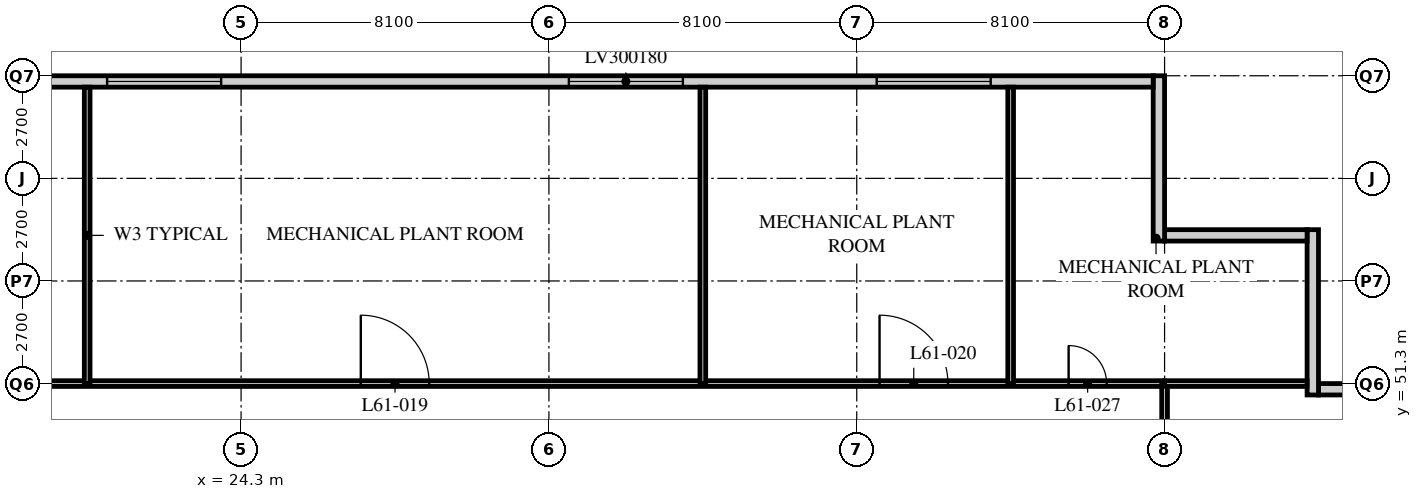
"""IFC4 building model, lengths in metres.
Left out: names, types, materials, properties, quantities, classifications, styles, units other than length and angle.
Written with IfcOpenShell. Run it as: python <this file> out.ifc"""

import sys

from ifc_helpers import new_model, si_unit, direction, frame, frame_2d, origin, place, context, subcontext, project, spatial, rectangle, extrude, element, fill, save


model = new_model("IFC4")
c1 = context("Model", 3, precision=1e-05, world=origin(), true_north=direction((0.0, 1.0)))
c2 = subcontext(c1, "Body", "Model", "MODEL_VIEW")
j1 = project(units=[si_unit("LENGTHUNIT", "METRE"), si_unit("PLANEANGLEUNIT", "RADIAN")], contexts=[c1])
p1 = place(None, origin())
s1 = spatial("IfcSite", under=j1, at=p1, CompositionType="ELEMENT")
p2 = place(p1, origin())
s2 = spatial("IfcBuilding", under=s1, at=p2, CompositionType="ELEMENT")
p3 = place(p2, frame((0.0, 0.0, 235.2)))
s3 = spatial("IfcBuildingStorey", under=s2, at=p3, CompositionType="ELEMENT", Elevation=235.2)
p4 = place(p3, frame((56.4, 51.15, 0.0), z_axis=(0.0, 0.0, 1.0), x_axis=(-1.0, 0.0, 0.0)))
e1 = element("IfcWall", 1, at=p4, inside=s3, PredefinedType="SOLIDWALL", context=c2, shape_type="SweptSolid", body=[
    extrude(rectangle(XDim=3.75, YDim=0.3, at=frame_2d((1.875, 0.0))), origin(), (0.0, 0.0, 1.0), 6.95),
])
p5 = place(p3, frame((52.5, 51.0, 0.0), z_axis=(0.0, 0.0, 1.0), x_axis=(0.0, 1.0, 0.0)))
e2 = element("IfcWall", 2, at=p5, inside=s3, PredefinedType="SOLIDWALL", context=c2, shape_type="SweptSolid", body=[
    extrude(rectangle(XDim=4.35, YDim=0.3, at=frame_2d((2.175, 0.0))), origin(), (0.0, 0.0, 1.0), 6.95),
])
p6 = place(p3, frame((52.35, 55.2, 0.0), z_axis=(0.0, 0.0, 1.0), x_axis=(-1.0, 0.0, 0.0)))
e3 = element("IfcWall", 3, at=p6, inside=s3, PredefinedType="SOLIDWALL", context=c2, shape_type="SweptSolid", body=[
    extrude(rectangle(XDim=3.75, YDim=0.3, at=frame_2d((1.875, 0.0))), origin(), (0.0, 0.0, 1.0), 6.95),
])
p7 = place(p3, frame((48.45, 55.05, 0.0), z_axis=(0.0, 0.0, 1.0), x_axis=(0.0, 1.0, 0.0)))
e4 = element("IfcWall", 4, at=p7, inside=s3, PredefinedType="SOLIDWALL", context=c2, shape_type="SweptSolid", body=[
    extrude(rectangle(XDim=4.35, YDim=0.3, at=frame_2d((2.175, 0.0))), origin(), (0.0, 0.0, 1.0), 5.95),
])
p8 = place(p3, frame((48.3, 59.25, 0.0), z_axis=(0.0, 0.0, 1.0), x_axis=(-1.0, 0.0, 0.0)))
e5 = element("IfcWall", 5, at=p8, inside=s3, PredefinedType="SOLIDWALL", context=c2, shape_type="SweptSolid", body=[
    extrude(rectangle(XDim=40.2, YDim=0.3, at=frame_2d((20.1, 0.0))), origin(), (0.0, 0.0, 1.0), 5.95),
])
p9 = place(p8, frame((4.275, 0.0, 1.0)))
e6 = element("IfcOpeningElement", 6, at=p9, cuts=e5, PredefinedType="OPENING", context=c2, shape_type="SweptSolid", body=[
    extrude(rectangle(XDim=3.0, YDim=1.8, at=frame_2d((1.5, 0.9))), frame((0.0, 0.16, 0.0), z_axis=(0.0, -1.0, 0.0), x_axis=(1.0, 0.0, 0.0)), (0.0, 0.0, 1.0), 0.32),
])
p10 = place(p8, frame((12.375, 0.0, 1.0)))
e7 = element("IfcOpeningElement", 7, at=p10, cuts=e5, PredefinedType="OPENING", context=c2, shape_type="SweptSolid", body=[
    extrude(rectangle(XDim=3.0, YDim=1.8, at=frame_2d((1.5, 0.9))), frame((0.0, 0.16, 0.0), z_axis=(0.0, -1.0, 0.0), x_axis=(1.0, 0.0, 0.0)), (0.0, 0.0, 1.0), 0.32),
])
p11 = place(p8, frame((24.525, 0.0, 1.0)))
e8 = element("IfcOpeningElement", 8, at=p11, cuts=e5, PredefinedType="OPENING", context=c2, shape_type="SweptSolid", body=[
    extrude(rectangle(XDim=3.0, YDim=1.8, at=frame_2d((1.5, 0.9))), frame((0.0, 0.16, 0.0), z_axis=(0.0, -1.0, 0.0), x_axis=(1.0, 0.0, 0.0)), (0.0, 0.0, 1.0), 0.32),
])
p12 = place(p8, frame((32.625, 0.0, 1.0)))
e9 = element("IfcOpeningElement", 9, at=p12, cuts=e5, PredefinedType="OPENING", context=c2, shape_type="SweptSolid", body=[
    extrude(rectangle(XDim=3.0, YDim=1.8, at=frame_2d((1.5, 0.9))), frame((0.0, 0.16, 0.0), z_axis=(0.0, -1.0, 0.0), x_axis=(1.0, 0.0, 0.0)), (0.0, 0.0, 1.0), 0.32),
])
p13 = place(p3, frame((8.1, 51.3, 0.0), z_axis=(0.0, 0.0, 1.0), x_axis=(1.0, 0.0, 0.0)))
e10 = element("IfcWall", 10, at=p13, inside=s3, PredefinedType="PARTITIONING", context=c2, shape_type="SweptSolid", body=[
    extrude(rectangle(XDim=40.5, YDim=0.15, at=frame_2d((20.25, 0.0))), origin(), (0.0, 0.0, 1.0), 6.95),
])
p14 = place(p13, frame((8.45, 0.0, 0.0)))
e11 = element("IfcOpeningElement", 11, at=p14, cuts=e10, PredefinedType="OPENING", context=c2, shape_type="SweptSolid", body=[
    extrude(rectangle(XDim=1.8, YDim=2.4, at=frame_2d((0.9, 1.2))), frame((0.0, 0.085, 0.0), z_axis=(0.0, -1.0, 0.0), x_axis=(1.0, 0.0, 0.0)), (0.0, 0.0, 1.0), 0.17),
])
p15 = place(p13, frame((19.35, 0.0, 0.0)))
e12 = element("IfcOpeningElement", 12, at=p15, cuts=e10, PredefinedType="OPENING", context=c2, shape_type="SweptSolid", body=[
    extrude(rectangle(XDim=1.8, YDim=2.4, at=frame_2d((0.9, 1.2))), frame((0.0, 0.085, 0.0), z_axis=(0.0, -1.0, 0.0), x_axis=(1.0, 0.0, 0.0)), (0.0, 0.0, 1.0), 0.17),
])
p16 = place(p13, frame((33.0, 0.0, 0.0)))
e13 = element("IfcOpeningElement", 13, at=p16, cuts=e10, PredefinedType="OPENING", context=c2, shape_type="SweptSolid", body=[
    extrude(rectangle(XDim=1.8, YDim=2.4, at=frame_2d((0.9, 1.2))), frame((0.0, 0.085, 0.0), z_axis=(0.0, -1.0, 0.0), x_axis=(1.0, 0.0, 0.0)), (0.0, 0.0, 1.0), 0.17),
])
p17 = place(p13, frame((37.975, 0.0, 0.0)))
e14 = element("IfcOpeningElement", 14, at=p17, cuts=e10, PredefinedType="OPENING", context=c2, shape_type="SweptSolid", body=[
    extrude(rectangle(XDim=1.0, YDim=2.1, at=frame_2d((0.5, 1.05))), frame((0.0, 0.085, 0.0), z_axis=(0.0, -1.0, 0.0), x_axis=(1.0, 0.0, 0.0)), (0.0, 0.0, 1.0), 0.17),
])
p18 = place(p13, frame((1.525, 0.0, 0.0)))
e15 = element("IfcOpeningElement", 15, at=p18, cuts=e10, PredefinedType="OPENING", context=c2, shape_type="SweptSolid", body=[
    extrude(rectangle(XDim=1.0, YDim=2.1, at=frame_2d((0.5, 1.05))), frame((0.0, 0.085, 0.0), z_axis=(0.0, -1.0, 0.0), x_axis=(1.0, 0.0, 0.0)), (0.0, 0.0, 1.0), 0.17),
])
p19 = place(p3, frame((48.6, 18.9, 0.0), z_axis=(0.0, 0.0, 1.0), x_axis=(0.0, 1.0, 0.0)))
e16 = element("IfcWall", 16, at=p19, inside=s3, PredefinedType="PARTITIONING", context=c2, shape_type="SweptSolid", body=[
    extrude(rectangle(XDim=32.4, YDim=0.15, at=frame_2d((16.2, 0.0))), origin(), (0.0, 0.0, 1.0), 5.95),
])
p20 = place(p19, frame((10.95, 0.0, 0.0)))
e17 = element("IfcOpeningElement", 17, at=p20, cuts=e16, PredefinedType="OPENING", context=c2, shape_type="SweptSolid", body=[
    extrude(rectangle(XDim=1.8, YDim=2.4, at=frame_2d((0.9, 1.2))), frame((0.0, 0.085, 0.0), z_axis=(0.0, -1.0, 0.0), x_axis=(1.0, 0.0, 0.0)), (0.0, 0.0, 1.0), 0.17),
])
p21 = place(p19, frame((27.15, 0.0, 0.0)))
e18 = element("IfcOpeningElement", 18, at=p21, cuts=e16, PredefinedType="OPENING", context=c2, shape_type="SweptSolid", body=[
    extrude(rectangle(XDim=1.8, YDim=2.4, at=frame_2d((0.9, 1.2))), frame((0.0, 0.085, 0.0), z_axis=(0.0, -1.0, 0.0), x_axis=(1.0, 0.0, 0.0)), (0.0, 0.0, 1.0), 0.17),
])
for number, where, z_axis, x_axis in (
    (19, (20.25, 51.3, 0.0), (0.0, 0.0, 1.0), (0.0, 1.0, 0.0)),
    (20, (36.45, 51.3, 0.0), (0.0, 0.0, 1.0), (0.0, 1.0, 0.0)),
):
    element("IfcWall", number, at=place(p3, frame(where, z_axis=z_axis, x_axis=x_axis)), inside=s3, PredefinedType="PARTITIONING", context=c2, shape_type="SweptSolid", body=[
        extrude(rectangle(XDim=7.8, YDim=0.15, at=frame_2d((3.9, 0.0))), origin(), (0.0, 0.0, 1.0), 6.95),
    ])
p22 = place(p3, frame((48.6, 51.3, 0.0), z_axis=(0.0, 0.0, 1.0), x_axis=(1.0, 0.0, 0.0)))
e21 = element("IfcWall", 21, at=p22, inside=s3, PredefinedType="PARTITIONING", context=c2, shape_type="SweptSolid", body=[
    extrude(rectangle(XDim=3.75, YDim=0.15, at=frame_2d((1.875, 0.0))), origin(), (0.0, 0.0, 1.0), 6.95),
])
p23 = place(p3, frame((44.55, 51.3, 0.0), z_axis=(0.0, 0.0, 1.0), x_axis=(0.0, 1.0, 0.0)))
e22 = element("IfcWall", 22, at=p23, inside=s3, PredefinedType="PARTITIONING", context=c2, shape_type="SweptSolid", body=[
    extrude(rectangle(XDim=7.8, YDim=0.15, at=frame_2d((3.9, 0.0))), origin(), (0.0, 0.0, 1.0), 6.95),
])
p24 = place(p9, origin())
e23 = element("IfcWindow", 23, at=p24, inside=s3, PartitioningType="SINGLE_PANEL", PredefinedType="USERDEFINED", context=c2, shape_type="SweptSolid", body=[
    extrude(rectangle(XDim=3.0, YDim=1.8, at=frame_2d((1.5, 0.9))), frame((0.0, 0.075, 0.0), z_axis=(0.0, -1.0, 0.0), x_axis=(1.0, 0.0, 0.0)), (0.0, 0.0, 1.0), 0.15),
])
fill(e6, e23)
p25 = place(p10, origin())
e24 = element("IfcWindow", 24, at=p25, inside=s3, PartitioningType="SINGLE_PANEL", PredefinedType="USERDEFINED", context=c2, shape_type="SweptSolid", body=[
    extrude(rectangle(XDim=3.0, YDim=1.8, at=frame_2d((1.5, 0.9))), frame((0.0, 0.075, 0.0), z_axis=(0.0, -1.0, 0.0), x_axis=(1.0, 0.0, 0.0)), (0.0, 0.0, 1.0), 0.15),
])
fill(e7, e24)
p26 = place(p11, origin())
e25 = element("IfcWindow", 25, at=p26, inside=s3, PartitioningType="SINGLE_PANEL", PredefinedType="USERDEFINED", context=c2, shape_type="SweptSolid", body=[
    extrude(rectangle(XDim=3.0, YDim=1.8, at=frame_2d((1.5, 0.9))), frame((0.0, 0.075, 0.0), z_axis=(0.0, -1.0, 0.0), x_axis=(1.0, 0.0, 0.0)), (0.0, 0.0, 1.0), 0.15),
])
fill(e8, e25)
p27 = place(p15, origin())
e26 = element("IfcDoor", 26, at=p27, inside=s3, OperationType="DOUBLE_DOOR_SINGLE_SWING", PredefinedType="DOOR", context=c2, shape_type="SweptSolid", body=[
    extrude(rectangle(XDim=1.8, YDim=2.4, at=frame_2d((0.9, 1.2))), frame((0.0, 0.025, 0.0), z_axis=(0.0, -1.0, 0.0), x_axis=(1.0, 0.0, 0.0)), (0.0, 0.0, 1.0), 0.05),
])
fill(e12, e26)
p28 = place(p16, origin())
e27 = element("IfcDoor", 27, at=p28, inside=s3, OperationType="DOUBLE_DOOR_SINGLE_SWING", PredefinedType="DOOR", context=c2, shape_type="SweptSolid", body=[
    extrude(rectangle(XDim=1.8, YDim=2.4, at=frame_2d((0.9, 1.2))), frame((0.0, 0.025, 0.0), z_axis=(0.0, -1.0, 0.0), x_axis=(1.0, 0.0, 0.0)), (0.0, 0.0, 1.0), 0.05),
])
fill(e13, e27)
p29 = place(p17, origin())
e28 = element("IfcDoor", 28, at=p29, inside=s3, OperationType="SINGLE_SWING_LEFT", PredefinedType="DOOR", context=c2, shape_type="SweptSolid", body=[
    extrude(rectangle(XDim=1.0, YDim=2.1, at=frame_2d((0.5, 1.05))), frame((0.0, 0.025, 0.0), z_axis=(0.0, -1.0, 0.0), x_axis=(1.0, 0.0, 0.0)), (0.0, 0.0, 1.0), 0.05),
])
fill(e14, e28)
save(model, sys.argv[1])
